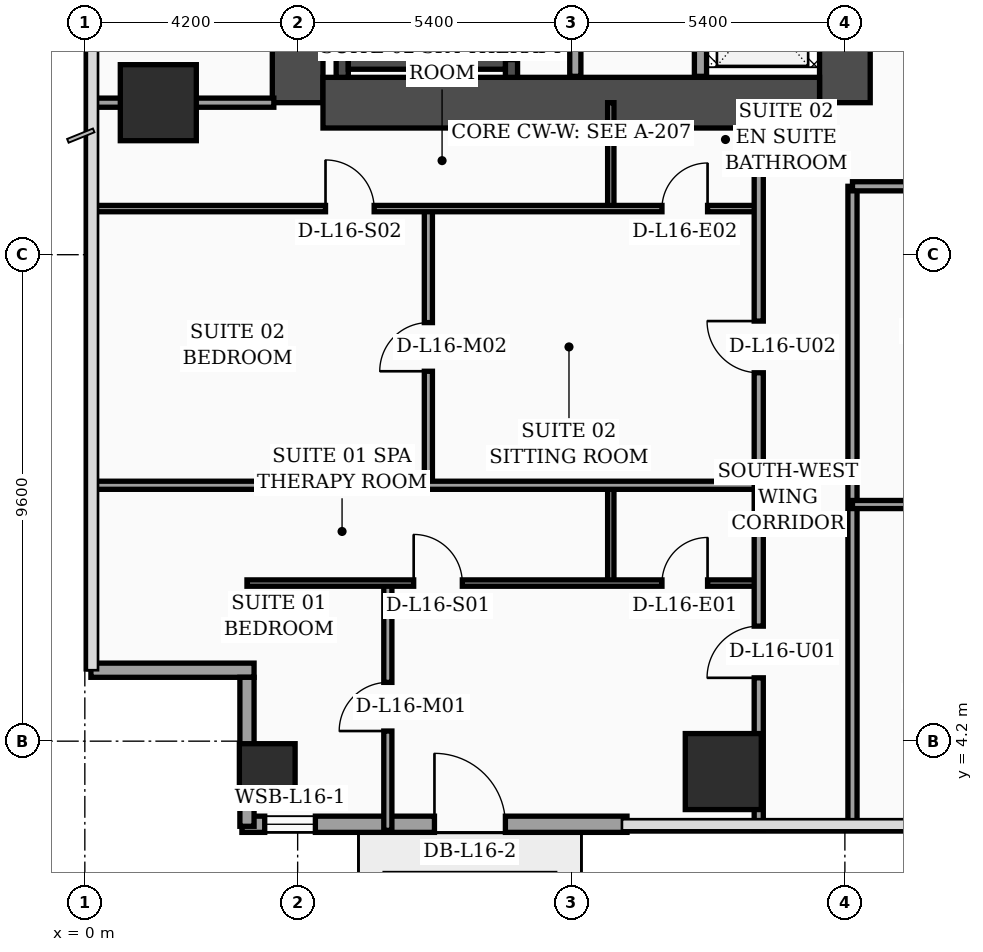
"""IFC4 building model, lengths in metres.
Left out: names, types, materials, properties, quantities, classifications, styles, units other than length and angle.
Written with IfcOpenShell. Run it as: python <this file> out.ifc"""

import sys

from ifc_helpers import new_model, si_unit, direction, frame, frame_2d, origin, origin_2d, place, context, subcontext, project, spatial, rectangle, hollow_rectangle, extrude, element, fill, save


model = new_model("IFC4")
c1 = context("Model", 3, precision=1e-05, world=origin(), true_north=direction((0.0, 1.0)))
c2 = subcontext(c1, "Body", "Model", "MODEL_VIEW")
j1 = project(units=[si_unit("LENGTHUNIT", "METRE"), si_unit("PLANEANGLEUNIT", "RADIAN")], contexts=[c1])
p1 = place(None, origin())
s1 = spatial("IfcSite", under=j1, at=p1, CompositionType="ELEMENT")
p2 = place(p1, origin())
s2 = spatial("IfcBuilding", under=s1, at=p2, CompositionType="ELEMENT")
p3 = place(p2, frame((0.0, 0.0, 69.8)))
s3 = spatial("IfcBuildingStorey", under=s2, at=p3, CompositionType="ELEMENT", Elevation=69.8)
p4 = place(p3, frame((4.2, 16.8, 0.0), z_axis=(0.0, 0.0, 1.0), x_axis=(0.0, 1.0, 0.0)))
e1 = element("IfcWall", 1, at=p4, inside=s3, PredefinedType="SHEAR", context=c2, shape_type="SweptSolid", body=[
    extrude(rectangle(XDim=21.6, YDim=1.0, at=frame_2d((10.8, 0.0))), origin(), (0.0, 0.0, 1.0), 3.56),
])
p5 = place(p3, frame((15.0, 16.8, 0.0), z_axis=(0.0, 0.0, 1.0), x_axis=(0.0, 1.0, 0.0)))
e2 = element("IfcWall", 2, at=p5, inside=s3, PredefinedType="SHEAR", context=c2, shape_type="SweptSolid", body=[
    extrude(rectangle(XDim=21.6, YDim=1.0, at=frame_2d((10.8, 0.0))), origin(), (0.0, 0.0, 1.0), 3.56),
])
p6 = place(p5, frame((8.65, 0.0, 0.0)))
e3 = element("IfcOpeningElement", 3, at=p6, cuts=e2, PredefinedType="OPENING", context=c2, shape_type="SweptSolid", body=[
    extrude(rectangle(XDim=1.1, YDim=2.2, at=frame_2d((0.55, 1.1))), frame((0.0, 0.51, 0.0), z_axis=(0.0, -1.0, 0.0), x_axis=(1.0, 0.0, 0.0)), (0.0, 0.0, 1.0), 1.02),
])
p7 = place(p5, frame((1.25, 0.0, 0.0)))
e4 = element("IfcOpeningElement", 4, at=p7, cuts=e2, PredefinedType="OPENING", context=c2, shape_type="SweptSolid", body=[
    extrude(rectangle(XDim=1.1, YDim=2.2, at=frame_2d((0.55, 1.1))), frame((0.0, 0.51, 0.0), z_axis=(0.0, -1.0, 0.0), x_axis=(1.0, 0.0, 0.0)), (0.0, 0.0, 1.0), 1.02),
])
p8 = place(p5, frame((3.8, 0.0, 0.0)))
e5 = element("IfcOpeningElement", 5, at=p8, cuts=e2, PredefinedType="OPENING", context=c2, shape_type="SweptSolid", body=[
    extrude(rectangle(XDim=1.1, YDim=2.2, at=frame_2d((0.55, 1.1))), frame((0.0, 0.51, 0.0), z_axis=(0.0, -1.0, 0.0), x_axis=(1.0, 0.0, 0.0)), (0.0, 0.0, 1.0), 1.02),
])
p9 = place(p5, frame((6.35, 0.0, 0.0)))
e6 = element("IfcOpeningElement", 6, at=p9, cuts=e2, PredefinedType="OPENING", context=c2, shape_type="SweptSolid", body=[
    extrude(rectangle(XDim=1.1, YDim=2.2, at=frame_2d((0.55, 1.1))), frame((0.0, 0.51, 0.0), z_axis=(0.0, -1.0, 0.0), x_axis=(1.0, 0.0, 0.0)), (0.0, 0.0, 1.0), 1.02),
])
p10 = place(p3, frame((4.7, 16.8, 0.0), z_axis=(0.0, 0.0, 1.0), x_axis=(1.0, 0.0, 0.0)))
e7 = element("IfcWall", 7, at=p10, inside=s3, PredefinedType="SHEAR", context=c2, shape_type="SweptSolid", body=[
    extrude(rectangle(XDim=9.8, YDim=1.0, at=frame_2d((4.9, 0.0))), origin(), (0.0, 0.0, 1.0), 3.56),
])
p11 = place(p3, frame((5.08, 17.3, 0.0), z_axis=(0.0, 0.0, 1.0), x_axis=(0.0, 1.0, 0.0)))
e8 = element("IfcWall", 8, at=p11, inside=s3, PredefinedType="SOLIDWALL", context=c2, shape_type="SweptSolid", body=[
    extrude(rectangle(XDim=9.49, YDim=0.24, at=frame_2d((4.745, 0.0))), origin(), (0.0, 0.0, 1.0), 3.56),
])
p12 = place(p3, frame((8.42, 17.3, 0.0), z_axis=(0.0, 0.0, 1.0), x_axis=(0.0, 1.0, 0.0)))
e9 = element("IfcWall", 9, at=p12, inside=s3, PredefinedType="SOLIDWALL", context=c2, shape_type="SweptSolid", body=[
    extrude(rectangle(XDim=9.49, YDim=0.24, at=frame_2d((4.745, 0.0))), origin(), (0.0, 0.0, 1.0), 3.56),
])
p13 = place(p12, frame((0.35, 0.0, 0.0)))
e10 = element("IfcOpeningElement", 10, at=p13, cuts=e9, PredefinedType="OPENING", context=c2, shape_type="SweptSolid", body=[
    extrude(rectangle(XDim=1.15, YDim=2.2, at=frame_2d((0.575, 1.1))), frame((0.0, 0.13, 0.0), z_axis=(0.0, -1.0, 0.0), x_axis=(1.0, 0.0, 0.0)), (0.0, 0.0, 1.0), 0.26),
])
p14 = place(p3, frame((5.2, 17.58, 0.0), z_axis=(0.0, 0.0, 1.0), x_axis=(1.0, 0.0, 0.0)))
e11 = element("IfcWall", 11, at=p14, inside=s3, PredefinedType="SOLIDWALL", context=c2, shape_type="SweptSolid", body=[
    extrude(rectangle(XDim=3.1, YDim=0.24, at=frame_2d((1.55, 0.0))), origin(), (0.0, 0.0, 1.0), 3.56),
])
p15 = place(p3, frame((3.6, 3.6, 0.0), z_axis=(0.0, 0.0, 1.0), x_axis=(1.0, 0.0, 0.0)))
e12 = element("IfcColumn", 12, at=p15, inside=s3, PredefinedType="COLUMN", context=c2, shape_type="SweptSolid", body=[
    extrude(hollow_rectangle(XDim=1.1, YDim=1.1, WallThickness=0.045, at=origin_2d()), origin(), (0.0, 0.0, 1.0), 3.56),
])
for number, where, z_axis, x_axis in (
    (13, (1.45, 16.8, 0.0), (0.0, 0.0, 1.0), (1.0, 0.0, 0.0)),
    (14, (12.6, 3.6, 0.0), (0.0, 0.0, 1.0), (1.0, 0.0, 0.0)),
):
    element("IfcColumn", number, at=place(p3, frame(where, z_axis=z_axis, x_axis=x_axis)), inside=s3, PredefinedType="COLUMN", context=c2, shape_type="SweptSolid", body=[
        extrude(rectangle(XDim=1.5, YDim=1.5, at=origin_2d()), origin(), (0.0, 0.0, 1.0), 3.56),
    ])
p16 = place(p3, frame((3.1, 2.56, 0.0), z_axis=(0.0, 0.0, 1.0), x_axis=(1.0, 0.0, 0.0)))
e15 = element("IfcWall", 15, at=p16, inside=s3, PredefinedType="SOLIDWALL", context=c2, shape_type="SweptSolid", body=[
    extrude(rectangle(XDim=7.6, YDim=0.32, at=frame_2d((3.8, 0.0))), origin(), (0.0, 0.0, 1.0), 3.56),
])
p17 = place(p16, frame((0.45, 0.0, 0.75)))
e16 = element("IfcOpeningElement", 16, at=p17, cuts=e15, PredefinedType="OPENING", context=c2, shape_type="SweptSolid", body=[
    extrude(rectangle(XDim=1.0, YDim=1.6, at=frame_2d((0.5, 0.8))), frame((0.0, 0.17, 0.0), z_axis=(0.0, -1.0, 0.0), x_axis=(1.0, 0.0, 0.0)), (0.0, 0.0, 1.0), 0.34),
])
p18 = place(p16, frame((3.8, 0.0, 0.0)))
e17 = element("IfcOpeningElement", 17, at=p18, cuts=e15, PredefinedType="OPENING", context=c2, shape_type="SweptSolid", body=[
    extrude(rectangle(XDim=1.4, YDim=2.25, at=frame_2d((0.7, 1.125))), frame((0.0, 0.17, 0.0), z_axis=(0.0, -1.0, 0.0), x_axis=(1.0, 0.0, 0.0)), (0.0, 0.0, 1.0), 0.34),
])
p19 = place(p3, frame((0.12, 5.6, 0.0), z_axis=(0.0, 0.0, 1.0), x_axis=(1.0, 0.0, 0.0)))
e18 = element("IfcWall", 18, at=p19, inside=s3, PredefinedType="SOLIDWALL", context=c2, shape_type="SweptSolid", body=[
    extrude(rectangle(XDim=3.22, YDim=0.28, at=frame_2d((1.61, 0.0))), origin(), (0.0, 0.0, 1.0), 2.84),
])
p20 = place(p3, frame((3.2, 5.46, 0.0), z_axis=(0.0, 0.0, 1.0), x_axis=(0.0, -1.0, 0.0)))
e19 = element("IfcWall", 19, at=p20, inside=s3, PredefinedType="SOLIDWALL", context=c2, shape_type="SweptSolid", body=[
    extrude(rectangle(XDim=2.94, YDim=0.28, at=frame_2d((1.47, 0.0))), origin(), (0.0, 0.0, 1.0), 2.84),
])
p21 = place(p3, frame((9.68, 17.32, 0.0), z_axis=(0.0, 0.0, 1.0), x_axis=(0.0, 1.0, 0.0)))
e20 = element("IfcWall", 20, at=p21, inside=s3, PredefinedType="SOLIDWALL", context=c2, shape_type="SweptSolid", body=[
    extrude(rectangle(XDim=7.68, YDim=0.22, at=frame_2d((3.84, 0.0))), origin(), (0.0, 0.0, 1.0), 3.56),
])
p22 = place(p3, frame((12.15, 17.32, 0.0), z_axis=(0.0, 0.0, 1.0), x_axis=(0.0, 1.0, 0.0)))
e21 = element("IfcWall", 21, at=p22, inside=s3, PredefinedType="SOLIDWALL", context=c2, shape_type="SweptSolid", body=[
    extrude(rectangle(XDim=7.65, YDim=0.24, at=frame_2d((3.825, 0.0))), origin(), (0.0, 0.0, 1.0), 3.56),
])
p23 = place(p3, frame((0.08, 16.8, 0.0), z_axis=(0.0, 0.0, 1.0), x_axis=(1.0, 0.0, 0.0)))
e22 = element("IfcWall", 22, at=p23, inside=s3, PredefinedType="PARTITIONING", context=c2, shape_type="SweptSolid", body=[
    extrude(rectangle(XDim=3.65, YDim=0.18, at=frame_2d((1.825, 0.0))), origin(), (0.0, 0.0, 1.0), 2.84),
])
p24 = place(p3, frame((10.38, 7.32, 0.0), z_axis=(0.0, 0.0, 1.0), x_axis=(0.0, 1.0, 0.0)))
e23 = element("IfcWall", 23, at=p24, inside=s3, PredefinedType="PARTITIONING", context=c2, shape_type="SweptSolid", body=[
    extrude(rectangle(XDim=1.93, YDim=0.125, at=frame_2d((0.965, 0.0))), origin(), (0.0, 0.0, 1.0), 3.56),
])
p25 = place(p3, frame((5.98, 2.44, 0.0), z_axis=(0.0, 0.0, 1.0), x_axis=(0.0, 1.0, 0.0)))
e24 = element("IfcWall", 24, at=p25, inside=s3, PredefinedType="PARTITIONING", context=c2, shape_type="SweptSolid", body=[
    extrude(rectangle(XDim=4.88, YDim=0.16, at=frame_2d((2.44, 0.0))), origin(), (0.0, 0.0, 1.0), 3.04),
])
p26 = place(p25, frame((1.96, 0.0, 0.0)))
e25 = element("IfcOpeningElement", 25, at=p26, cuts=e24, PredefinedType="OPENING", context=c2, shape_type="SweptSolid", body=[
    extrude(rectangle(XDim=0.96, YDim=2.2, at=frame_2d((0.48, 1.1))), frame((0.0, 0.09, 0.0), z_axis=(0.0, -1.0, 0.0), x_axis=(1.0, 0.0, 0.0)), (0.0, 0.0, 1.0), 0.18),
])
p27 = place(p3, frame((3.2, 7.32, 0.0), z_axis=(0.0, 0.0, 1.0), x_axis=(1.0, 0.0, 0.0)))
e26 = element("IfcWall", 26, at=p27, inside=s3, PredefinedType="PARTITIONING", context=c2, shape_type="SweptSolid", body=[
    extrude(rectangle(XDim=10.1, YDim=0.125, at=frame_2d((5.05, 0.0))), origin(), (0.0, 0.0, 1.0), 2.84),
])
p28 = place(p27, frame((3.29, 0.0, 0.0)))
e27 = element("IfcOpeningElement", 27, at=p28, cuts=e26, PredefinedType="OPENING", context=c2, shape_type="SweptSolid", body=[
    extrude(rectangle(XDim=0.96, YDim=2.2, at=frame_2d((0.48, 1.1))), frame((0.0, 0.073, 0.0), z_axis=(0.0, -1.0, 0.0), x_axis=(1.0, 0.0, 0.0)), (0.0, 0.0, 1.0), 0.145),
])
p29 = place(p27, frame((8.19, 0.0, 0.0)))
e28 = element("IfcOpeningElement", 28, at=p29, cuts=e26, PredefinedType="OPENING", context=c2, shape_type="SweptSolid", body=[
    extrude(rectangle(XDim=0.9, YDim=2.15, at=frame_2d((0.45, 1.075))), frame((0.0, 0.073, 0.0), z_axis=(0.0, -1.0, 0.0), x_axis=(1.0, 0.0, 0.0)), (0.0, 0.0, 1.0), 0.145),
])
p30 = place(p3, frame((10.38, 14.71, 0.0), z_axis=(0.0, 0.0, 1.0), x_axis=(0.0, 1.0, 0.0)))
e29 = element("IfcWall", 29, at=p30, inside=s3, PredefinedType="PARTITIONING", context=c2, shape_type="SweptSolid", body=[
    extrude(rectangle(XDim=2.09, YDim=0.125, at=frame_2d((1.045, 0.0))), origin(), (0.0, 0.0, 1.0), 3.56),
])
p31 = place(p3, frame((6.78, 9.25, 0.0), z_axis=(0.0, 0.0, 1.0), x_axis=(0.0, 1.0, 0.0)))
e30 = element("IfcWall", 30, at=p31, inside=s3, PredefinedType="PARTITIONING", context=c2, shape_type="SweptSolid", body=[
    extrude(rectangle(XDim=5.46, YDim=0.16, at=frame_2d((2.73, 0.0))), origin(), (0.0, 0.0, 1.0), 3.14),
])
p32 = place(p31, frame((2.25, 0.0, 0.0)))
e31 = element("IfcOpeningElement", 31, at=p32, cuts=e30, PredefinedType="OPENING", context=c2, shape_type="SweptSolid", body=[
    extrude(rectangle(XDim=0.96, YDim=2.2, at=frame_2d((0.48, 1.1))), frame((0.0, 0.09, 0.0), z_axis=(0.0, -1.0, 0.0), x_axis=(1.0, 0.0, 0.0)), (0.0, 0.0, 1.0), 0.18),
])
p33 = place(p3, frame((0.08, 14.71, 0.0), z_axis=(0.0, 0.0, 1.0), x_axis=(1.0, 0.0, 0.0)))
e32 = element("IfcWall", 32, at=p33, inside=s3, PredefinedType="PARTITIONING", context=c2, shape_type="SweptSolid", body=[
    extrude(rectangle(XDim=13.22, YDim=0.125, at=frame_2d((6.61, 0.0))), origin(), (0.0, 0.0, 1.0), 2.84),
])
p34 = place(p33, frame((4.67, 0.0, 0.0)))
e33 = element("IfcOpeningElement", 33, at=p34, cuts=e32, PredefinedType="OPENING", context=c2, shape_type="SweptSolid", body=[
    extrude(rectangle(XDim=0.96, YDim=2.2, at=frame_2d((0.48, 1.1))), frame((0.0, 0.073, 0.0), z_axis=(0.0, -1.0, 0.0), x_axis=(1.0, 0.0, 0.0)), (0.0, 0.0, 1.0), 0.145),
])
p35 = place(p33, frame((11.31, 0.0, 0.0)))
e34 = element("IfcOpeningElement", 34, at=p35, cuts=e32, PredefinedType="OPENING", context=c2, shape_type="SweptSolid", body=[
    extrude(rectangle(XDim=0.9, YDim=2.15, at=frame_2d((0.45, 1.075))), frame((0.0, 0.073, 0.0), z_axis=(0.0, -1.0, 0.0), x_axis=(1.0, 0.0, 0.0)), (0.0, 0.0, 1.0), 0.145),
])
p36 = place(p3, frame((0.08, 9.25, 0.0), z_axis=(0.0, 0.0, 1.0), x_axis=(1.0, 0.0, 0.0)))
e35 = element("IfcWall", 35, at=p36, inside=s3, PredefinedType="PARTITIONING", context=c2, shape_type="SweptSolid", body=[
    extrude(rectangle(XDim=13.22, YDim=0.16, at=frame_2d((6.61, 0.0))), origin(), (0.0, 0.0, 1.0), 2.84),
])
p37 = place(p3, frame((13.3, 2.44, 0.0), z_axis=(0.0, 0.0, 1.0), x_axis=(0.0, 1.0, 0.0)))
e36 = element("IfcWall", 36, at=p37, inside=s3, PredefinedType="PARTITIONING", context=c2, shape_type="SweptSolid", body=[
    extrude(rectangle(XDim=14.36, YDim=0.18, at=frame_2d((7.18, 0.0))), origin(), (0.0, 0.0, 1.0), 3.04),
])
p38 = place(p37, frame((3.01, 0.0, 0.0)))
e37 = element("IfcOpeningElement", 37, at=p38, cuts=e36, PredefinedType="OPENING", context=c2, shape_type="SweptSolid", body=[
    extrude(rectangle(XDim=1.02, YDim=2.2, at=frame_2d((0.51, 1.1))), frame((0.0, 0.1, 0.0), z_axis=(0.0, -1.0, 0.0), x_axis=(1.0, 0.0, 0.0)), (0.0, 0.0, 1.0), 0.2),
])
p39 = place(p37, frame((9.03, 0.0, 0.0)))
e38 = element("IfcOpeningElement", 38, at=p39, cuts=e36, PredefinedType="OPENING", context=c2, shape_type="SweptSolid", body=[
    extrude(rectangle(XDim=1.02, YDim=2.2, at=frame_2d((0.51, 1.1))), frame((0.0, 0.1, 0.0), z_axis=(0.0, -1.0, 0.0), x_axis=(1.0, 0.0, 0.0)), (0.0, 0.0, 1.0), 0.2),
])
p40 = place(p3, frame((15.15, 2.44, 0.0), z_axis=(0.0, 0.0, 1.0), x_axis=(0.0, 1.0, 0.0)))
e39 = element("IfcWall", 39, at=p40, inside=s3, PredefinedType="PARTITIONING", context=c2, shape_type="SweptSolid", body=[
    extrude(rectangle(XDim=12.71, YDim=0.18, at=frame_2d((6.355, 0.0))), origin(), (0.0, 0.0, 1.0), 3.04),
])
p41 = place(p3, frame((15.15, 8.87, 0.0), z_axis=(0.0, 0.0, 1.0), x_axis=(1.0, 0.0, 0.0)))
e40 = element("IfcWall", 40, at=p41, inside=s3, PredefinedType="PARTITIONING", context=c2, shape_type="SweptSolid", body=[
    extrude(rectangle(XDim=4.45, YDim=0.16, at=frame_2d((2.225, 0.0))), origin(), (0.0, 0.0, 1.0), 3.56),
])
p42 = place(p41, frame((1.75, 0.0, 0.0)))
e41 = element("IfcOpeningElement", 41, at=p42, cuts=e40, PredefinedType="OPENING", context=c2, shape_type="SweptSolid", body=[
    extrude(rectangle(XDim=0.96, YDim=2.2, at=frame_2d((0.48, 1.1))), frame((0.0, 0.09, 0.0), z_axis=(0.0, -1.0, 0.0), x_axis=(1.0, 0.0, 0.0)), (0.0, 0.0, 1.0), 0.18),
])
p43 = place(p3, frame((15.15, 15.15, 0.0), z_axis=(0.0, 0.0, 1.0), x_axis=(1.0, 0.0, 0.0)))
e42 = element("IfcWall", 42, at=p43, inside=s3, PredefinedType="PARTITIONING", context=c2, shape_type="SweptSolid", body=[
    extrude(rectangle(XDim=6.45, YDim=0.18, at=frame_2d((3.225, 0.0))), origin(), (0.0, 0.0, 1.0), 2.34),
])
p44 = place(p43, frame((1.74, 0.0, 0.0)))
e43 = element("IfcOpeningElement", 43, at=p44, cuts=e42, PredefinedType="OPENING", context=c2, shape_type="SweptSolid", body=[
    extrude(rectangle(XDim=1.02, YDim=2.2, at=frame_2d((0.51, 1.1))), frame((0.0, 0.1, 0.0), z_axis=(0.0, -1.0, 0.0), x_axis=(1.0, 0.0, 0.0)), (0.0, 0.0, 1.0), 0.2),
])
p45 = place(p17, origin())
e44 = element("IfcWindow", 44, at=p45, inside=s3, PartitioningType="SINGLE_PANEL", PredefinedType="WINDOW", context=c2, shape_type="SweptSolid", body=[
    extrude(rectangle(XDim=1.0, YDim=1.6, at=frame_2d((0.5, 0.8))), frame((0.0, 0.03, 0.0), z_axis=(0.0, -1.0, 0.0), x_axis=(1.0, 0.0, 0.0)), (0.0, 0.0, 1.0), 0.06),
])
fill(e16, e44)
p46 = place(p18, origin())
e45 = element("IfcDoor", 45, at=p46, inside=s3, OperationType="SINGLE_SWING_LEFT", PredefinedType="DOOR", context=c2, shape_type="SweptSolid", body=[
    extrude(rectangle(XDim=1.4, YDim=2.25, at=frame_2d((0.7, 1.125))), frame((0.0, 0.025, 0.0), z_axis=(0.0, -1.0, 0.0), x_axis=(1.0, 0.0, 0.0)), (0.0, 0.0, 1.0), 0.05),
])
fill(e17, e45)
p47 = place(p26, origin())
e46 = element("IfcDoor", 46, at=p47, inside=s3, OperationType="SINGLE_SWING_LEFT", PredefinedType="DOOR", context=c2, shape_type="SweptSolid", body=[
    extrude(rectangle(XDim=0.96, YDim=2.2, at=frame_2d((0.48, 1.1))), frame((0.0, 0.025, 0.0), z_axis=(0.0, -1.0, 0.0), x_axis=(1.0, 0.0, 0.0)), (0.0, 0.0, 1.0), 0.05),
])
fill(e25, e46)
p48 = place(p28, origin())
e47 = element("IfcDoor", 47, at=p48, inside=s3, OperationType="SINGLE_SWING_LEFT", PredefinedType="DOOR", context=c2, shape_type="SweptSolid", body=[
    extrude(rectangle(XDim=0.96, YDim=2.2, at=frame_2d((0.48, 1.1))), frame((0.0, 0.025, 0.0), z_axis=(0.0, -1.0, 0.0), x_axis=(1.0, 0.0, 0.0)), (0.0, 0.0, 1.0), 0.05),
])
fill(e27, e47)
p49 = place(p29, origin())
e48 = element("IfcDoor", 48, at=p49, inside=s3, OperationType="SINGLE_SWING_RIGHT", PredefinedType="DOOR", context=c2, shape_type="SweptSolid", body=[
    extrude(rectangle(XDim=0.9, YDim=2.15, at=frame_2d((0.45, 1.075))), frame((0.0, 0.025, 0.0), z_axis=(0.0, -1.0, 0.0), x_axis=(1.0, 0.0, 0.0)), (0.0, 0.0, 1.0), 0.05),
])
fill(e28, e48)
p50 = place(p32, origin())
e49 = element("IfcDoor", 49, at=p50, inside=s3, OperationType="SINGLE_SWING_LEFT", PredefinedType="DOOR", context=c2, shape_type="SweptSolid", body=[
    extrude(rectangle(XDim=0.96, YDim=2.2, at=frame_2d((0.48, 1.1))), frame((0.0, 0.025, 0.0), z_axis=(0.0, -1.0, 0.0), x_axis=(1.0, 0.0, 0.0)), (0.0, 0.0, 1.0), 0.05),
])
fill(e31, e49)
p51 = place(p34, origin())
e50 = element("IfcDoor", 50, at=p51, inside=s3, OperationType="SINGLE_SWING_LEFT", PredefinedType="DOOR", context=c2, shape_type="SweptSolid", body=[
    extrude(rectangle(XDim=0.96, YDim=2.2, at=frame_2d((0.48, 1.1))), frame((0.0, 0.025, 0.0), z_axis=(0.0, -1.0, 0.0), x_axis=(1.0, 0.0, 0.0)), (0.0, 0.0, 1.0), 0.05),
])
fill(e33, e50)
p52 = place(p35, origin())
e51 = element("IfcDoor", 51, at=p52, inside=s3, OperationType="SINGLE_SWING_RIGHT", PredefinedType="DOOR", context=c2, shape_type="SweptSolid", body=[
    extrude(rectangle(XDim=0.9, YDim=2.15, at=frame_2d((0.45, 1.075))), frame((0.0, 0.025, 0.0), z_axis=(0.0, -1.0, 0.0), x_axis=(1.0, 0.0, 0.0)), (0.0, 0.0, 1.0), 0.05),
])
fill(e34, e51)
p53 = place(p38, origin())
e52 = element("IfcDoor", 52, at=p53, inside=s3, OperationType="SINGLE_SWING_LEFT", PredefinedType="DOOR", context=c2, shape_type="SweptSolid", body=[
    extrude(rectangle(XDim=1.02, YDim=2.2, at=frame_2d((0.51, 1.1))), frame((0.0, 0.025, 0.0), z_axis=(0.0, -1.0, 0.0), x_axis=(1.0, 0.0, 0.0)), (0.0, 0.0, 1.0), 0.05),
])
fill(e37, e52)
p54 = place(p39, origin())
e53 = element("IfcDoor", 53, at=p54, inside=s3, OperationType="SINGLE_SWING_RIGHT", PredefinedType="DOOR", context=c2, shape_type="SweptSolid", body=[
    extrude(rectangle(XDim=1.02, YDim=2.2, at=frame_2d((0.51, 1.1))), frame((0.0, 0.025, 0.0), z_axis=(0.0, -1.0, 0.0), x_axis=(1.0, 0.0, 0.0)), (0.0, 0.0, 1.0), 0.05),
])
fill(e38, e53)
p55 = place(p13, origin())
e54 = element("IfcDoor", 54, at=p55, inside=s3, OperationType="SINGLE_SWING_LEFT", PredefinedType="DOOR", context=c2, shape_type="SweptSolid", body=[
    extrude(rectangle(XDim=1.15, YDim=2.2, at=frame_2d((0.575, 1.1))), frame((0.0, 0.025, 0.0), z_axis=(0.0, -1.0, 0.0), x_axis=(1.0, 0.0, 0.0)), (0.0, 0.0, 1.0), 0.05),
])
fill(e10, e54)
save(model, sys.argv[1])
